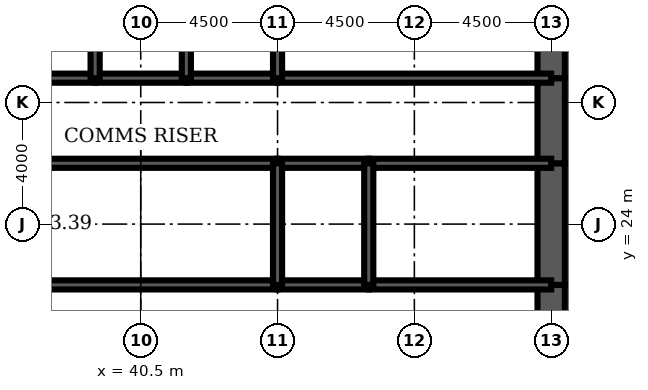
"""IFC4 building model, lengths in metres.
Left out: names, types, materials, properties, quantities, classifications, styles, units other than length and angle.
Written with IfcOpenShell. Run it as: python <this file> out.ifc"""

import sys

from ifc_helpers import new_model, si_unit, direction, frame, frame_2d, origin, place, context, subcontext, project, spatial, rectangle, extrude, element, fill, save


model = new_model("IFC4")
c1 = context("Model", 3, precision=1e-05, world=origin(), true_north=direction((0.0, 1.0)))
c2 = subcontext(c1, "Body", "Model", "MODEL_VIEW")
j1 = project(units=[si_unit("LENGTHUNIT", "METRE"), si_unit("PLANEANGLEUNIT", "RADIAN")], contexts=[c1])
p1 = place(None, origin())
s1 = spatial("IfcSite", under=j1, at=p1, CompositionType="ELEMENT")
p2 = place(p1, origin())
s2 = spatial("IfcBuilding", under=s1, at=p2, CompositionType="ELEMENT")
p3 = place(p2, frame((0.0, 0.0, 167.7)))
s3 = spatial("IfcBuildingStorey", under=s2, at=p3, CompositionType="ELEMENT", Elevation=167.7)
p4 = place(p3, frame((54.0, 19.2, 0.0), z_axis=(0.0, 0.0, 1.0), x_axis=(0.0, 1.0, 0.0)))
e1 = element("IfcWall", 1, at=p4, inside=s3, PredefinedType="SHEAR", context=c2, shape_type="SweptSolid", body=[
    extrude(rectangle(XDim=2.8, YDim=0.9, at=frame_2d((1.4, 0.0))), origin(), (0.0, 0.0, 1.0), 4.2),
])
p5 = place(p4, frame((0.4, 0.0, 0.0)))
e2 = element("IfcOpeningElement", 2, at=p5, cuts=e1, PredefinedType="OPENING", context=c2, shape_type="SweptSolid", body=[
    extrude(rectangle(XDim=1.8, YDim=2.1, at=frame_2d((0.9, 1.05))), frame((0.0, 0.46, 0.0), z_axis=(0.0, -1.0, 0.0), x_axis=(1.0, 0.0, 0.0)), (0.0, 0.0, 1.0), 0.92),
])
p6 = place(p3, frame((54.0, 22.0, 0.0), z_axis=(0.0, 0.0, 1.0), x_axis=(0.0, 1.0, 0.0)))
e3 = element("IfcWall", 3, at=p6, inside=s3, PredefinedType="SHEAR", context=c2, shape_type="SweptSolid", body=[
    extrude(rectangle(XDim=4.0, YDim=0.9, at=frame_2d((2.0, 0.0))), origin(), (0.0, 0.0, 1.0), 4.2),
])
p7 = place(p3, frame((54.0, 26.0, 0.0), z_axis=(0.0, 0.0, 1.0), x_axis=(0.0, 1.0, 0.0)))
e4 = element("IfcWall", 4, at=p7, inside=s3, PredefinedType="SHEAR", context=c2, shape_type="SweptSolid", body=[
    extrude(rectangle(XDim=2.8, YDim=0.9, at=frame_2d((1.4, 0.0))), origin(), (0.0, 0.0, 1.0), 4.2),
])
p8 = place(p7, frame((0.6, 0.0, 0.0)))
e5 = element("IfcOpeningElement", 5, at=p8, cuts=e4, PredefinedType="OPENING", context=c2, shape_type="SweptSolid", body=[
    extrude(rectangle(XDim=1.8, YDim=2.1, at=frame_2d((0.9, 1.05))), frame((0.0, 0.46, 0.0), z_axis=(0.0, -1.0, 0.0), x_axis=(1.0, 0.0, 0.0)), (0.0, 0.0, 1.0), 0.92),
])
p9 = place(p3, frame((54.0, 28.8, 0.0), z_axis=(0.0, 0.0, 1.0), x_axis=(0.0, 1.0, 0.0)))
e6 = element("IfcWall", 6, at=p9, inside=s3, PredefinedType="SHEAR", context=c2, shape_type="SweptSolid", body=[
    extrude(rectangle(XDim=3.2, YDim=0.9, at=frame_2d((1.6, 0.0))), origin(), (0.0, 0.0, 1.0), 4.2),
])
for number, where, z_axis, x_axis in (
    (7, (36.0, 28.8, 0.0), (0.0, 0.0, 1.0), (1.0, 0.0, 0.0)),
    (8, (39.0, 28.8, 0.0), (0.0, 0.0, 1.0), (1.0, 0.0, 0.0)),
):
    element("IfcWall", number, at=place(p3, frame(where, z_axis=z_axis, x_axis=x_axis)), inside=s3, PredefinedType="SOLIDWALL", context=c2, shape_type="SweptSolid", body=[
        extrude(rectangle(XDim=3.0, YDim=0.3, at=frame_2d((1.5, 0.0))), origin(), (0.0, 0.0, 1.0), 4.2),
    ])
p10 = place(p3, frame((42.0, 28.8, 0.0), z_axis=(0.0, 0.0, 1.0), x_axis=(1.0, 0.0, 0.0)))
e9 = element("IfcWall", 9, at=p10, inside=s3, PredefinedType="SOLIDWALL", context=c2, shape_type="SweptSolid", body=[
    extrude(rectangle(XDim=3.0, YDim=0.3, at=frame_2d((1.5, 0.0))), origin(), (0.0, 0.0, 1.0), 4.2),
])
p11 = place(p10, frame((0.95, 0.0, 0.0)))
e10 = element("IfcOpeningElement", 10, at=p11, cuts=e9, PredefinedType="OPENING", context=c2, shape_type="SweptSolid", body=[
    extrude(rectangle(XDim=1.1, YDim=2.2, at=frame_2d((0.55, 1.1))), frame((0.0, 0.16, 0.0), z_axis=(0.0, -1.0, 0.0), x_axis=(1.0, 0.0, 0.0)), (0.0, 0.0, 1.0), 0.32),
])
p12 = place(p3, frame((45.0, 28.8, 0.0), z_axis=(0.0, 0.0, 1.0), x_axis=(1.0, 0.0, 0.0)))
e11 = element("IfcWall", 11, at=p12, inside=s3, PredefinedType="SOLIDWALL", context=c2, shape_type="SweptSolid", body=[
    extrude(rectangle(XDim=9.0, YDim=0.3, at=frame_2d((4.5, 0.0))), origin(), (0.0, 0.0, 1.0), 4.2),
])
p13 = place(p12, frame((7.35, 0.0, 0.0)))
e12 = element("IfcOpeningElement", 12, at=p13, cuts=e11, PredefinedType="OPENING", context=c2, shape_type="SweptSolid", body=[
    extrude(rectangle(XDim=1.0, YDim=2.1, at=frame_2d((0.5, 1.05))), frame((0.0, 0.16, 0.0), z_axis=(0.0, -1.0, 0.0), x_axis=(1.0, 0.0, 0.0)), (0.0, 0.0, 1.0), 0.32),
])
p14 = place(p3, frame((36.0, 22.0, 0.0), z_axis=(0.0, 0.0, 1.0), x_axis=(1.0, 0.0, 0.0)))
e13 = element("IfcWall", 13, at=p14, inside=s3, PredefinedType="SOLIDWALL", context=c2, shape_type="SweptSolid", body=[
    extrude(rectangle(XDim=9.0, YDim=0.3, at=frame_2d((4.5, 0.0))), origin(), (0.0, 0.0, 1.0), 4.2),
])
p15 = place(p14, frame((4.0, 0.0, 0.0)))
e14 = element("IfcOpeningElement", 14, at=p15, cuts=e13, PredefinedType="OPENING", context=c2, shape_type="SweptSolid", body=[
    extrude(rectangle(XDim=1.0, YDim=2.1, at=frame_2d((0.5, 1.05))), frame((0.0, 0.16, 0.0), z_axis=(0.0, -1.0, 0.0), x_axis=(1.0, 0.0, 0.0)), (0.0, 0.0, 1.0), 0.32),
])
p16 = place(p3, frame((45.0, 22.0, 0.0), z_axis=(0.0, 0.0, 1.0), x_axis=(1.0, 0.0, 0.0)))
e15 = element("IfcWall", 15, at=p16, inside=s3, PredefinedType="SOLIDWALL", context=c2, shape_type="SweptSolid", body=[
    extrude(rectangle(XDim=3.0, YDim=0.3, at=frame_2d((1.5, 0.0))), origin(), (0.0, 0.0, 1.0), 4.2),
])
p17 = place(p16, frame((1.0, 0.0, 0.0)))
e16 = element("IfcOpeningElement", 16, at=p17, cuts=e15, PredefinedType="OPENING", context=c2, shape_type="SweptSolid", body=[
    extrude(rectangle(XDim=1.0, YDim=2.1, at=frame_2d((0.5, 1.05))), frame((0.0, 0.16, 0.0), z_axis=(0.0, -1.0, 0.0), x_axis=(1.0, 0.0, 0.0)), (0.0, 0.0, 1.0), 0.32),
])
p18 = place(p3, frame((48.0, 22.0, 0.0), z_axis=(0.0, 0.0, 1.0), x_axis=(1.0, 0.0, 0.0)))
e17 = element("IfcWall", 17, at=p18, inside=s3, PredefinedType="SOLIDWALL", context=c2, shape_type="SweptSolid", body=[
    extrude(rectangle(XDim=6.0, YDim=0.3, at=frame_2d((3.0, 0.0))), origin(), (0.0, 0.0, 1.0), 4.2),
])
p19 = place(p18, frame((2.0, 0.0, 0.0)))
e18 = element("IfcOpeningElement", 18, at=p19, cuts=e17, PredefinedType="OPENING", context=c2, shape_type="SweptSolid", body=[
    extrude(rectangle(XDim=1.0, YDim=2.1, at=frame_2d((0.5, 1.05))), frame((0.0, 0.16, 0.0), z_axis=(0.0, -1.0, 0.0), x_axis=(1.0, 0.0, 0.0)), (0.0, 0.0, 1.0), 0.32),
])
p20 = place(p18, frame((4.3, 0.0, 0.0)))
e19 = element("IfcOpeningElement", 19, at=p20, cuts=e17, PredefinedType="OPENING", context=c2, shape_type="SweptSolid", body=[
    extrude(rectangle(XDim=1.0, YDim=2.1, at=frame_2d((0.5, 1.05))), frame((0.0, 0.16, 0.0), z_axis=(0.0, -1.0, 0.0), x_axis=(1.0, 0.0, 0.0)), (0.0, 0.0, 1.0), 0.32),
])
p21 = place(p3, frame((36.0, 26.0, 0.0), z_axis=(0.0, 0.0, 1.0), x_axis=(1.0, 0.0, 0.0)))
e20 = element("IfcWall", 20, at=p21, inside=s3, PredefinedType="SOLIDWALL", context=c2, shape_type="SweptSolid", body=[
    extrude(rectangle(XDim=9.0, YDim=0.3, at=frame_2d((4.5, 0.0))), origin(), (0.0, 0.0, 1.0), 4.2),
])
p22 = place(p3, frame((45.0, 26.0, 0.0), z_axis=(0.0, 0.0, 1.0), x_axis=(1.0, 0.0, 0.0)))
e21 = element("IfcWall", 21, at=p22, inside=s3, PredefinedType="SOLIDWALL", context=c2, shape_type="SweptSolid", body=[
    extrude(rectangle(XDim=3.0, YDim=0.3, at=frame_2d((1.5, 0.0))), origin(), (0.0, 0.0, 1.0), 4.2),
])
p23 = place(p3, frame((48.0, 26.0, 0.0), z_axis=(0.0, 0.0, 1.0), x_axis=(1.0, 0.0, 0.0)))
e22 = element("IfcWall", 22, at=p23, inside=s3, PredefinedType="SOLIDWALL", context=c2, shape_type="SweptSolid", body=[
    extrude(rectangle(XDim=6.0, YDim=0.3, at=frame_2d((3.0, 0.0))), origin(), (0.0, 0.0, 1.0), 4.2),
])
for number, where, z_axis, x_axis in (
    (23, (39.0, 28.8, 0.0), (0.0, 0.0, 1.0), (0.0, 1.0, 0.0)),
    (24, (42.0, 28.8, 0.0), (0.0, 0.0, 1.0), (0.0, 1.0, 0.0)),
    (25, (45.0, 28.8, 0.0), (0.0, 0.0, 1.0), (0.0, 1.0, 0.0)),
):
    element("IfcWall", number, at=place(p3, frame(where, z_axis=z_axis, x_axis=x_axis)), inside=s3, PredefinedType="SOLIDWALL", context=c2, shape_type="SweptSolid", body=[
        extrude(rectangle(XDim=3.2, YDim=0.3, at=frame_2d((1.6, 0.0))), origin(), (0.0, 0.0, 1.0), 4.2),
    ])
for number, where, z_axis, x_axis in (
    (26, (45.0, 22.0, 0.0), (0.0, 0.0, 1.0), (0.0, 1.0, 0.0)),
    (27, (48.0, 22.0, 0.0), (0.0, 0.0, 1.0), (0.0, 1.0, 0.0)),
):
    element("IfcWall", number, at=place(p3, frame(where, z_axis=z_axis, x_axis=x_axis)), inside=s3, PredefinedType="SOLIDWALL", context=c2, shape_type="SweptSolid", body=[
        extrude(rectangle(XDim=4.0, YDim=0.3, at=frame_2d((2.0, 0.0))), origin(), (0.0, 0.0, 1.0), 4.2),
    ])
p24 = place(p3, frame((38.5, 22.15, 0.0), z_axis=(0.0, 0.0, 1.0), x_axis=(0.0, 1.0, 0.0)))
e28 = element("IfcWall", 28, at=p24, inside=s3, PredefinedType="PARTITIONING", context=c2, shape_type="SweptSolid", body=[
    extrude(rectangle(XDim=3.7, YDim=0.15, at=frame_2d((1.85, 0.0))), origin(), (0.0, 0.0, 1.0), 3.0),
])
p25 = place(p24, frame((2.2, 0.0, 0.0)))
e29 = element("IfcOpeningElement", 29, at=p25, cuts=e28, PredefinedType="OPENING", context=c2, shape_type="SweptSolid", body=[
    extrude(rectangle(XDim=1.0, YDim=2.1, at=frame_2d((0.5, 1.05))), frame((0.0, 0.085, 0.0), z_axis=(0.0, -1.0, 0.0), x_axis=(1.0, 0.0, 0.0)), (0.0, 0.0, 1.0), 0.17),
])
p26 = place(p3, frame((51.975, 22.15, 0.0), z_axis=(0.0, 0.0, 1.0), x_axis=(0.0, 1.0, 0.0)))
e30 = element("IfcWall", 30, at=p26, inside=s3, PredefinedType="PARTITIONING", context=c2, shape_type="SweptSolid", body=[
    extrude(rectangle(XDim=3.7, YDim=0.15, at=frame_2d((1.85, 0.0))), origin(), (0.0, 0.0, 1.0), 3.0),
])
p27 = place(p3, frame((47.7, 26.15, 0.0), z_axis=(0.0, 0.0, 1.0), x_axis=(0.0, 1.0, 0.0)))
e31 = element("IfcWall", 31, at=p27, inside=s3, PredefinedType="PARTITIONING", context=c2, shape_type="SweptSolid", body=[
    extrude(rectangle(XDim=2.5, YDim=0.15, at=frame_2d((1.25, 0.0))), origin(), (0.0, 0.0, 1.0), 3.0),
])
p28 = place(p27, frame((1.15, 0.0, 0.0)))
e32 = element("IfcOpeningElement", 32, at=p28, cuts=e31, PredefinedType="OPENING", context=c2, shape_type="SweptSolid", body=[
    extrude(rectangle(XDim=1.0, YDim=2.1, at=frame_2d((0.5, 1.05))), frame((0.0, 0.085, 0.0), z_axis=(0.0, -1.0, 0.0), x_axis=(1.0, 0.0, 0.0)), (0.0, 0.0, 1.0), 0.17),
])
p29 = place(p25, origin())
e33 = element("IfcDoor", 33, at=p29, inside=s3, OperationType="SINGLE_SWING_RIGHT", PredefinedType="DOOR", context=c2, shape_type="SweptSolid", body=[
    extrude(rectangle(XDim=1.0, YDim=2.1, at=frame_2d((0.5, 1.05))), frame((0.0, 0.025, 0.0), z_axis=(0.0, -1.0, 0.0), x_axis=(1.0, 0.0, 0.0)), (0.0, 0.0, 1.0), 0.05),
])
fill(e29, e33)
p30 = place(p28, origin())
e34 = element("IfcDoor", 34, at=p30, inside=s3, OperationType="SINGLE_SWING_RIGHT", PredefinedType="DOOR", context=c2, shape_type="SweptSolid", body=[
    extrude(rectangle(XDim=1.0, YDim=2.1, at=frame_2d((0.5, 1.05))), frame((0.0, 0.025, 0.0), z_axis=(0.0, -1.0, 0.0), x_axis=(1.0, 0.0, 0.0)), (0.0, 0.0, 1.0), 0.05),
])
fill(e32, e34)
p31 = place(p11, origin())
e35 = element("IfcDoor", 35, at=p31, inside=s3, OperationType="DOUBLE_DOOR_SLIDING", PredefinedType="USERDEFINED", context=c2, shape_type="SweptSolid", body=[
    extrude(rectangle(XDim=1.1, YDim=2.2, at=frame_2d((0.55, 1.1))), frame((0.0, 0.025, 0.0), z_axis=(0.0, -1.0, 0.0), x_axis=(1.0, 0.0, 0.0)), (0.0, 0.0, 1.0), 0.05),
])
fill(e10, e35)
p32 = place(p13, origin())
e36 = element("IfcDoor", 36, at=p32, inside=s3, OperationType="SINGLE_SWING_RIGHT", PredefinedType="DOOR", context=c2, shape_type="SweptSolid", body=[
    extrude(rectangle(XDim=1.0, YDim=2.1, at=frame_2d((0.5, 1.05))), frame((0.0, 0.025, 0.0), z_axis=(0.0, -1.0, 0.0), x_axis=(1.0, 0.0, 0.0)), (0.0, 0.0, 1.0), 0.05),
])
fill(e12, e36)
p33 = place(p5, origin())
e37 = element("IfcDoor", 37, at=p33, inside=s3, OperationType="SINGLE_SWING_LEFT", PredefinedType="DOOR", context=c2, shape_type="SweptSolid", body=[
    extrude(rectangle(XDim=1.8, YDim=2.1, at=frame_2d((0.9, 1.05))), frame((0.0, 0.45, 0.0), z_axis=(0.0, -1.0, 0.0), x_axis=(1.0, 0.0, 0.0)), (0.0, 0.0, 1.0), 0.899),
])
fill(e2, e37)
p34 = place(p8, origin())
e38 = element("IfcDoor", 38, at=p34, inside=s3, OperationType="SINGLE_SWING_LEFT", PredefinedType="DOOR", context=c2, shape_type="SweptSolid", body=[
    extrude(rectangle(XDim=1.8, YDim=2.1, at=frame_2d((0.9, 1.05))), frame((0.0, 0.45, 0.0), z_axis=(0.0, -1.0, 0.0), x_axis=(1.0, 0.0, 0.0)), (0.0, 0.0, 1.0), 0.899),
])
fill(e5, e38)
p35 = place(p15, origin())
e39 = element("IfcDoor", 39, at=p35, inside=s3, OperationType="SINGLE_SWING_LEFT", PredefinedType="DOOR", context=c2, shape_type="SweptSolid", body=[
    extrude(rectangle(XDim=1.0, YDim=2.1, at=frame_2d((0.5, 1.05))), frame((0.0, 0.025, 0.0), z_axis=(0.0, -1.0, 0.0), x_axis=(1.0, 0.0, 0.0)), (0.0, 0.0, 1.0), 0.05),
])
fill(e14, e39)
p36 = place(p17, origin())
e40 = element("IfcDoor", 40, at=p36, inside=s3, OperationType="SINGLE_SWING_LEFT", PredefinedType="DOOR", context=c2, shape_type="SweptSolid", body=[
    extrude(rectangle(XDim=1.0, YDim=2.1, at=frame_2d((0.5, 1.05))), frame((0.0, 0.025, 0.0), z_axis=(0.0, -1.0, 0.0), x_axis=(1.0, 0.0, 0.0)), (0.0, 0.0, 1.0), 0.05),
])
fill(e16, e40)
p37 = place(p19, origin())
e41 = element("IfcDoor", 41, at=p37, inside=s3, OperationType="SINGLE_SWING_LEFT", PredefinedType="DOOR", context=c2, shape_type="SweptSolid", body=[
    extrude(rectangle(XDim=1.0, YDim=2.1, at=frame_2d((0.5, 1.05))), frame((0.0, 0.025, 0.0), z_axis=(0.0, -1.0, 0.0), x_axis=(1.0, 0.0, 0.0)), (0.0, 0.0, 1.0), 0.05),
])
fill(e18, e41)
p38 = place(p20, origin())
e42 = element("IfcDoor", 42, at=p38, inside=s3, OperationType="SINGLE_SWING_RIGHT", PredefinedType="DOOR", context=c2, shape_type="SweptSolid", body=[
    extrude(rectangle(XDim=1.0, YDim=2.1, at=frame_2d((0.5, 1.05))), frame((0.0, 0.025, 0.0), z_axis=(0.0, -1.0, 0.0), x_axis=(1.0, 0.0, 0.0)), (0.0, 0.0, 1.0), 0.05),
])
fill(e19, e42)
save(model, sys.argv[1])
